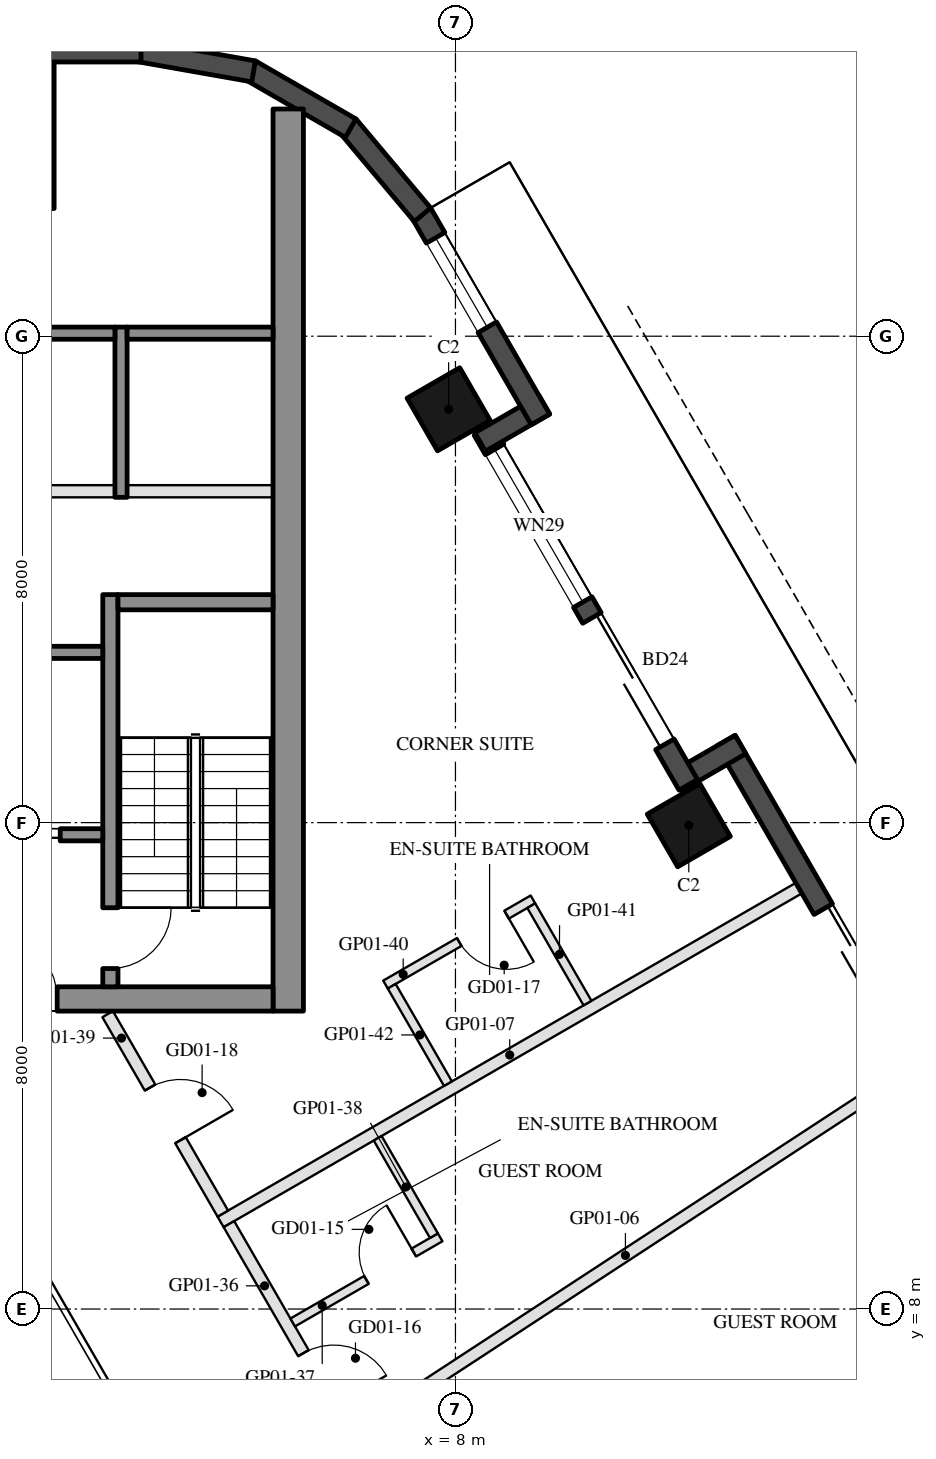
"""IFC4 building model, lengths in metres.
Left out: names, types, materials, properties, quantities, classifications, styles, units other than length and angle.
Written with IfcOpenShell. Run it as: python <this file> out.ifc"""

import sys

from ifc_helpers import new_model, si_unit, direction, frame, frame_2d, origin, origin_2d, place, context, subcontext, project, spatial, rectangle, hollow_rectangle, extrude, element, fill, save


model = new_model("IFC4")
c1 = context("Model", 3, precision=1e-05, world=origin(), true_north=direction((0.0, 1.0)))
c2 = subcontext(c1, "Body", "Model", "MODEL_VIEW")
j1 = project(units=[si_unit("LENGTHUNIT", "METRE"), si_unit("PLANEANGLEUNIT", "RADIAN")], contexts=[c1])
p1 = place(None, origin())
s1 = spatial("IfcSite", under=j1, at=p1, CompositionType="ELEMENT")
p2 = place(p1, origin())
s2 = spatial("IfcBuilding", under=s1, at=p2, CompositionType="ELEMENT")
p3 = place(p2, frame((0.0, 0.0, 46.5)))
s3 = spatial("IfcBuildingStorey", under=s2, at=p3, CompositionType="ELEMENT", Elevation=46.5)
for number, where, z_axis, x_axis in (
    (1, (11.838, 15.957, 0.0), (0.0, 0.0, 1.0), (-0.5, 0.866, 0.0)),
    (2, (7.888, 22.798, 0.0), (0.0, 0.0, 1.0), (-0.5, 0.866, 0.0)),
):
    element("IfcColumn", number, at=place(p3, frame(where, z_axis=z_axis, x_axis=x_axis)), inside=s3, PredefinedType="COLUMN", context=c2, shape_type="SweptSolid", body=[
        extrude(hollow_rectangle(XDim=1.0, YDim=1.0, WallThickness=0.045, at=origin_2d()), origin(), (0.0, 0.0, 1.0), 3.7),
    ])
p4 = place(p3, frame((0.0, 27.3, 0.0), z_axis=(0.0, 0.0, 1.0), x_axis=(1.0, 0.0, 0.0)))
e3 = element("IfcColumn", 3, at=p4, inside=s3, PredefinedType="COLUMN", context=c2, shape_type="SweptSolid", body=[
    extrude(hollow_rectangle(XDim=2.8, YDim=2.4, WallThickness=0.07, at=origin_2d()), origin(), (0.0, 0.0, 1.0), 3.7),
])
p5 = place(p3, frame((17.299, 8.948, 0.0), z_axis=(0.0, 0.0, 1.0), x_axis=(-0.500010041276, 0.866019606374, 0.0)))
e4 = element("IfcWall", 4, at=p5, inside=s3, PredefinedType="SOLIDWALL", context=c2, shape_type="SweptSolid", body=[
    extrude(rectangle(XDim=9.7, YDim=0.35, at=frame_2d((4.85, 0.0))), origin(), (0.0, 0.0, 1.0), 3.55),
])
p6 = place(p5, frame((1.8, 0.0, 0.0)))
e5 = element("IfcOpeningElement", 5, at=p6, cuts=e4, PredefinedType="OPENING", context=c2, shape_type="SweptSolid", body=[
    extrude(rectangle(XDim=1.2, YDim=2.4, at=frame_2d((0.6, 1.2))), frame((0.0, 0.185, 0.0), z_axis=(0.0, -1.0, 0.0), x_axis=(1.0, 0.0, 0.0)), (0.0, 0.0, 1.0), 0.37),
])
p7 = place(p5, frame((5.0, 0.0, 0.0)))
e6 = element("IfcOpeningElement", 6, at=p7, cuts=e4, PredefinedType="OPENING", context=c2, shape_type="SweptSolid", body=[
    extrude(rectangle(XDim=1.5, YDim=2.4, at=frame_2d((0.75, 1.2))), frame((0.0, 0.185, 0.0), z_axis=(0.0, -1.0, 0.0), x_axis=(1.0, 0.0, 0.0)), (0.0, 0.0, 1.0), 0.37),
])
p8 = place(p3, frame((12.688, 17.284, 0.0), z_axis=(0.0, 0.0, 1.0), x_axis=(-0.865955602162, -0.500120880472, 0.0)))
e7 = element("IfcWall", 7, at=p8, inside=s3, PredefinedType="SOLIDWALL", context=c2, shape_type="SweptSolid", body=[
    extrude(rectangle(XDim=1.22, YDim=0.35, at=frame_2d((0.61, 0.0))), origin(), (0.0, 0.0, 1.0), 3.55),
])
p9 = place(p3, frame((11.829, 16.621, 0.0), z_axis=(0.0, 0.0, 1.0), x_axis=(-0.500003597184, 0.866023326939, 0.0)))
e8 = element("IfcWall", 8, at=p9, inside=s3, PredefinedType="SOLIDWALL", context=c2, shape_type="SweptSolid", body=[
    extrude(rectangle(XDim=6.74, YDim=0.35, at=frame_2d((3.37, 0.0))), origin(), (0.0, 0.0, 1.0), 3.55),
])
p10 = place(p9, frame((0.77, 0.0, 0.0)))
e9 = element("IfcOpeningElement", 9, at=p10, cuts=e8, PredefinedType="OPENING", context=c2, shape_type="SweptSolid", body=[
    extrude(rectangle(XDim=2.4, YDim=2.4, at=frame_2d((1.2, 1.2))), frame((0.0, 0.185, 0.0), z_axis=(0.0, -1.0, 0.0), x_axis=(1.0, 0.0, 0.0)), (0.0, 0.0, 1.0), 0.37),
])
p11 = place(p9, frame((3.47, 0.0, 0.3)))
e10 = element("IfcOpeningElement", 10, at=p11, cuts=e8, PredefinedType="OPENING", context=c2, shape_type="SweptSolid", body=[
    extrude(rectangle(XDim=2.9, YDim=2.65, at=frame_2d((1.45, 1.325))), frame((0.0, 0.185, 0.0), z_axis=(0.0, -1.0, 0.0), x_axis=(1.0, 0.0, 0.0)), (0.0, 0.0, 1.0), 0.37),
])
p12 = place(p3, frame((8.406, 22.26, 0.0), z_axis=(0.0, 0.0, 1.0), x_axis=(0.865955602162, 0.500120880472, 0.0)))
e11 = element("IfcWall", 11, at=p12, inside=s3, PredefinedType="SOLIDWALL", context=c2, shape_type="SweptSolid", body=[
    extrude(rectangle(XDim=1.22, YDim=0.35, at=frame_2d((0.61, 0.0))), origin(), (0.0, 0.0, 1.0), 3.55),
])
p13 = place(p3, frame((9.398, 22.631, 0.0), z_axis=(0.0, 0.0, 1.0), x_axis=(-0.499954521343, 0.866051659307, 0.0)))
e12 = element("IfcWall", 12, at=p13, inside=s3, PredefinedType="SOLIDWALL", context=c2, shape_type="SweptSolid", body=[
    extrude(rectangle(XDim=3.916, YDim=0.35, at=frame_2d((1.958, 0.0))), origin(), (0.0, 0.0, 1.0), 3.55),
])
p14 = place(p13, frame((1.75, 0.0, 0.3)))
e13 = element("IfcOpeningElement", 13, at=p14, cuts=e12, PredefinedType="OPENING", context=c2, shape_type="SweptSolid", body=[
    extrude(rectangle(XDim=1.7, YDim=2.65, at=frame_2d((0.85, 1.325))), frame((0.0, 0.185, 0.0), z_axis=(0.0, -1.0, 0.0), x_axis=(1.0, 0.0, 0.0)), (0.0, 0.0, 1.0), 0.37),
])
p15 = place(p3, frame((7.458, 25.998, 0.0), z_axis=(0.0, 0.0, 1.0), x_axis=(-0.642808304945, 0.766027077259, 0.0)))
e14 = element("IfcWall", 14, at=p15, inside=s3, PredefinedType="SOLIDWALL", context=c2, shape_type="SweptSolid", body=[
    extrude(rectangle(XDim=1.91, YDim=0.35, at=frame_2d((0.955, 0.0))), origin(), (0.0, 0.0, 1.0), 3.55),
])
for number, where, z_axis, x_axis in (
    (15, (6.277, 27.422, 0.0), (0.0, 0.0, 1.0), (-0.866, 0.5, 0.0)),
    (16, (4.68, 28.356, 0.0), (0.0, 0.0, 1.0), (-0.985, 0.174, 0.0)),
):
    element("IfcWall", number, at=place(p3, frame(where, z_axis=z_axis, x_axis=x_axis)), inside=s3, PredefinedType="SOLIDWALL", context=c2, shape_type="SweptSolid", body=[
        extrude(rectangle(XDim=1.91, YDim=0.35, at=frame_2d((0.955, 0.0))), origin(), (0.0, 0.0, 1.0), 3.55),
    ])
p16 = place(p3, frame((2.829, 28.685, 0.0), z_axis=(0.0, 0.0, 1.0), x_axis=(-1.0, 0.0, 0.0)))
e17 = element("IfcWall", 17, at=p16, inside=s3, PredefinedType="SOLIDWALL", context=c2, shape_type="SweptSolid", body=[
    extrude(rectangle(XDim=5.658, YDim=0.35, at=frame_2d((2.829, 0.0))), origin(), (0.0, 0.0, 1.0), 3.55),
])
p17 = place(p3, frame((5.25, 12.9, 0.0), z_axis=(0.0, 0.0, 1.0), x_axis=(0.0, 1.0, 0.0)))
e18 = element("IfcWall", 18, at=p17, inside=s3, PredefinedType="SHEAR", context=c2, shape_type="SweptSolid", body=[
    extrude(rectangle(XDim=14.837, YDim=0.5, at=frame_2d((7.418, 0.0))), origin(), (0.0, 0.0, 1.0), 3.5),
])
p18 = place(p3, frame((5.0, 13.1, 0.0), z_axis=(0.0, 0.0, 1.0), x_axis=(-1.0, 0.0, 0.0)))
e19 = element("IfcWall", 19, at=p18, inside=s3, PredefinedType="SHEAR", context=c2, shape_type="SweptSolid", body=[
    extrude(rectangle(XDim=10.0, YDim=0.4, at=frame_2d((5.0, 0.0))), origin(), (0.0, 0.0, 1.0), 3.5),
])
p19 = place(p18, frame((3.55, 0.0, 0.0)))
e20 = element("IfcOpeningElement", 20, at=p19, cuts=e19, PredefinedType="OPENING", context=c2, shape_type="SweptSolid", body=[
    extrude(rectangle(XDim=1.1, YDim=2.1, at=frame_2d((0.55, 1.05))), frame((0.0, 0.21, 0.0), z_axis=(0.0, -1.0, 0.0), x_axis=(1.0, 0.0, 0.0)), (0.0, 0.0, 1.0), 0.42),
])
p20 = place(p18, frame((5.85, 0.0, 0.0)))
e21 = element("IfcOpeningElement", 21, at=p20, cuts=e19, PredefinedType="OPENING", context=c2, shape_type="SweptSolid", body=[
    extrude(rectangle(XDim=1.4, YDim=2.1, at=frame_2d((0.7, 1.05))), frame((0.0, 0.21, 0.0), z_axis=(0.0, -1.0, 0.0), x_axis=(1.0, 0.0, 0.0)), (0.0, 0.0, 1.0), 0.42),
])
p21 = place(p3, frame((2.325, 13.3, 0.0), z_axis=(0.0, 0.0, 1.0), x_axis=(0.0, 1.0, 0.0)))
e22 = element("IfcWall", 22, at=p21, inside=s3, PredefinedType="SHEAR", context=c2, shape_type="SweptSolid", body=[
    extrude(rectangle(XDim=6.45, YDim=0.25, at=frame_2d((3.225, 0.0))), origin(), (0.0, 0.0, 1.0), 3.5),
])
p22 = place(p21, frame((0.3, 0.0, 0.0)))
e23 = element("IfcOpeningElement", 23, at=p22, cuts=e22, PredefinedType="OPENING", context=c2, shape_type="SweptSolid", body=[
    extrude(rectangle(XDim=1.0, YDim=2.1, at=frame_2d((0.5, 1.05))), frame((0.0, 0.135, 0.0), z_axis=(0.0, -1.0, 0.0), x_axis=(1.0, 0.0, 0.0)), (0.0, 0.0, 1.0), 0.27),
])
p23 = place(p3, frame((5.0, 19.625, 0.0), z_axis=(0.0, 0.0, 1.0), x_axis=(-1.0, 0.0, 0.0)))
e24 = element("IfcWall", 24, at=p23, inside=s3, PredefinedType="SHEAR", context=c2, shape_type="SweptSolid", body=[
    extrude(rectangle(XDim=2.55, YDim=0.25, at=frame_2d((1.275, 0.0))), origin(), (0.0, 0.0, 1.0), 3.5),
])
p24 = place(p3, frame((2.2, 18.8, 0.0), z_axis=(0.0, 0.0, 1.0), x_axis=(-1.0, 0.0, 0.0)))
e25 = element("IfcWall", 25, at=p24, inside=s3, PredefinedType="SHEAR", context=c2, shape_type="SweptSolid", body=[
    extrude(rectangle(XDim=2.8, YDim=0.2, at=frame_2d((1.4, 0.0))), origin(), (0.0, 0.0, 1.0), 3.5),
])
p25 = place(p3, frame((2.2, 15.8, 0.0), z_axis=(0.0, 0.0, 1.0), x_axis=(-1.0, 0.0, 0.0)))
e26 = element("IfcWall", 26, at=p25, inside=s3, PredefinedType="SHEAR", context=c2, shape_type="SweptSolid", body=[
    extrude(rectangle(XDim=2.8, YDim=0.2, at=frame_2d((1.4, 0.0))), origin(), (0.0, 0.0, 1.0), 3.5),
])
p26 = place(p25, frame((0.7, 0.0, 0.0)))
e27 = element("IfcOpeningElement", 27, at=p26, cuts=e26, PredefinedType="OPENING", context=c2, shape_type="SweptSolid", body=[
    extrude(rectangle(XDim=1.2, YDim=2.1, at=frame_2d((0.6, 1.05))), frame((0.0, 0.11, 0.0), z_axis=(0.0, -1.0, 0.0), x_axis=(1.0, 0.0, 0.0)), (0.0, 0.0, 1.0), 0.22),
])
p27 = place(p3, frame((2.5, 21.35, 0.0), z_axis=(0.0, 0.0, 1.0), x_axis=(0.0, 1.0, 0.0)))
e28 = element("IfcWall", 28, at=p27, inside=s3, PredefinedType="SHEAR", context=c2, shape_type="SweptSolid", body=[
    extrude(rectangle(XDim=2.8, YDim=0.2, at=frame_2d((1.4, 0.0))), origin(), (0.0, 0.0, 1.0), 3.5),
])
p28 = place(p3, frame((5.0, 24.05, 0.0), z_axis=(0.0, 0.0, 1.0), x_axis=(-1.0, 0.0, 0.0)))
e29 = element("IfcWall", 29, at=p28, inside=s3, PredefinedType="SHEAR", context=c2, shape_type="SweptSolid", body=[
    extrude(rectangle(XDim=2.4, YDim=0.2, at=frame_2d((1.2, 0.0))), origin(), (0.0, 0.0, 1.0), 3.5),
])
p29 = place(p3, frame((2.4, 24.05, 0.0), z_axis=(0.0, 0.0, 1.0), x_axis=(-1.0, 0.0, 0.0)))
e30 = element("IfcWall", 30, at=p29, inside=s3, PredefinedType="SHEAR", context=c2, shape_type="SweptSolid", body=[
    extrude(rectangle(XDim=2.8, YDim=0.2, at=frame_2d((1.4, 0.0))), origin(), (0.0, 0.0, 1.0), 3.5),
])
p30 = place(p3, frame((5.0, 21.45, 0.0), z_axis=(0.0, 0.0, 1.0), x_axis=(-1.0, 0.0, 0.0)))
e31 = element("IfcWall", 31, at=p30, inside=s3, PredefinedType="PARTITIONING", context=c2, shape_type="SweptSolid", body=[
    extrude(rectangle(XDim=2.4, YDim=0.2, at=frame_2d((1.2, 0.0))), origin(), (0.0, 0.0, 1.0), 3.5),
])
p31 = place(p3, frame((2.4, 21.45, 0.0), z_axis=(0.0, 0.0, 1.0), x_axis=(-1.0, 0.0, 0.0)))
e32 = element("IfcWall", 32, at=p31, inside=s3, PredefinedType="PARTITIONING", context=c2, shape_type="SweptSolid", body=[
    extrude(rectangle(XDim=2.8, YDim=0.2, at=frame_2d((1.4, 0.0))), origin(), (0.0, 0.0, 1.0), 3.5),
])
p32 = place(p3, frame((17.055, 7.22, 0.0), z_axis=(0.0, 0.0, 1.0), x_axis=(-0.87960357017, -0.475707430407, 0.0)))
e33 = element("IfcWall", 33, at=p32, inside=s3, PredefinedType="PARTITIONING", context=c2, shape_type="SweptSolid", body=[
    extrude(rectangle(XDim=10.084, YDim=0.2, at=frame_2d((5.042, 0.0))), origin(), (0.0, 0.0, 1.0), 2.96),
])
p33 = place(p3, frame((15.397, 11.892, 0.0), z_axis=(0.0, 0.0, 1.0), x_axis=(-0.836898817878, -0.547357624076, 0.0)))
e34 = element("IfcWall", 34, at=p33, inside=s3, PredefinedType="PARTITIONING", context=c2, shape_type="SweptSolid", body=[
    extrude(rectangle(XDim=10.997, YDim=0.2, at=frame_2d((5.499, 0.0))), origin(), (0.0, 0.0, 1.0), 2.96),
])
p34 = place(p3, frame((13.647, 14.923, 0.0), z_axis=(0.0, 0.0, 1.0), x_axis=(-0.866027479907, -0.499996404033, 0.0)))
e35 = element("IfcWall", 35, at=p34, inside=s3, PredefinedType="PARTITIONING", context=c2, shape_type="SweptSolid", body=[
    extrude(rectangle(XDim=10.98, YDim=0.2, at=frame_2d((5.49, 0.0))), origin(), (0.0, 0.0, 1.0), 2.96),
])
p35 = place(p3, frame((4.275, 9.396, 0.0), z_axis=(0.0, 0.0, 1.0), x_axis=(0.499971370958, -0.866041932139, 0.0)))
e36 = element("IfcWall", 36, at=p35, inside=s3, PredefinedType="PARTITIONING", context=c2, shape_type="SweptSolid", body=[
    extrude(rectangle(XDim=3.906, YDim=0.2, at=frame_2d((1.953, 0.0))), origin(), (0.0, 0.0, 1.0), 2.95),
])
p36 = place(p35, frame((2.45, 0.0, 0.0)))
e37 = element("IfcOpeningElement", 37, at=p36, cuts=e36, PredefinedType="OPENING", context=c2, shape_type="SweptSolid", body=[
    extrude(rectangle(XDim=1.0, YDim=2.1, at=frame_2d((0.5, 1.05))), frame((0.0, 0.11, 0.0), z_axis=(0.0, -1.0, 0.0), x_axis=(1.0, 0.0, 0.0)), (0.0, 0.0, 1.0), 0.22),
])
p37 = place(p3, frame((5.324, 7.779, 0.0), z_axis=(0.0, 0.0, 1.0), x_axis=(0.865996816683, 0.500049511043, 0.0)))
e38 = element("IfcWall", 38, at=p37, inside=s3, PredefinedType="PARTITIONING", context=c2, shape_type="SweptSolid", body=[
    extrude(rectangle(XDim=2.8, YDim=0.15, at=frame_2d((1.4, 0.0))), origin(), (0.0, 0.0, 1.0), 2.95),
])
p38 = place(p37, frame((1.4, 0.0, 0.0)))
e39 = element("IfcOpeningElement", 39, at=p38, cuts=e38, PredefinedType="OPENING", context=c2, shape_type="SweptSolid", body=[
    extrude(rectangle(XDim=0.9, YDim=2.1, at=frame_2d((0.45, 1.05))), frame((0.0, 0.085, 0.0), z_axis=(0.0, -1.0, 0.0), x_axis=(1.0, 0.0, 0.0)), (0.0, 0.0, 1.0), 0.17),
])
p39 = place(p3, frame((7.646, 9.207, 0.0), z_axis=(0.0, 0.0, 1.0), x_axis=(-0.49994333299, 0.866058118026, 0.0)))
e40 = element("IfcWall", 40, at=p39, inside=s3, PredefinedType="PARTITIONING", context=c2, shape_type="SweptSolid", body=[
    extrude(rectangle(XDim=1.85, YDim=0.15, at=frame_2d((0.925, 0.0))), origin(), (0.0, 0.0, 1.0), 3.55),
])
p40 = place(p3, frame((2.281, 12.85, 0.0), z_axis=(0.0, 0.0, 1.0), x_axis=(0.499979074716, -0.866037484666, 0.0)))
e41 = element("IfcWall", 41, at=p40, inside=s3, PredefinedType="PARTITIONING", context=c2, shape_type="SweptSolid", body=[
    extrude(rectangle(XDim=3.788, YDim=0.2, at=frame_2d((1.894, 0.0))), origin(), (0.0, 0.0, 1.0), 2.95),
])
p41 = place(p40, frame((1.394, 0.0, 0.0)))
e42 = element("IfcOpeningElement", 42, at=p41, cuts=e41, PredefinedType="OPENING", context=c2, shape_type="SweptSolid", body=[
    extrude(rectangle(XDim=1.0, YDim=2.1, at=frame_2d((0.5, 1.05))), frame((0.0, 0.11, 0.0), z_axis=(0.0, -1.0, 0.0), x_axis=(1.0, 0.0, 0.0)), (0.0, 0.0, 1.0), 0.22),
])
p42 = place(p3, frame((9.274, 14.737, 0.0), z_axis=(0.0, 0.0, 1.0), x_axis=(-0.866018616679, -0.500011755427, 0.0)))
e43 = element("IfcWall", 43, at=p42, inside=s3, PredefinedType="PARTITIONING", context=c2, shape_type="SweptSolid", body=[
    extrude(rectangle(XDim=2.8, YDim=0.15, at=frame_2d((1.4, 0.0))), origin(), (0.0, 0.0, 1.0), 3.55),
])
p43 = place(p42, frame((0.5, 0.0, 0.0)))
e44 = element("IfcOpeningElement", 44, at=p43, cuts=e43, PredefinedType="OPENING", context=c2, shape_type="SweptSolid", body=[
    extrude(rectangle(XDim=0.9, YDim=2.1, at=frame_2d((0.45, 1.05))), frame((0.0, 0.085, 0.0), z_axis=(0.0, -1.0, 0.0), x_axis=(1.0, 0.0, 0.0)), (0.0, 0.0, 1.0), 0.17),
])
p44 = place(p3, frame((10.172, 13.032, 0.0), z_axis=(0.0, 0.0, 1.0), x_axis=(-0.500042316284, 0.866000971088, 0.0)))
e45 = element("IfcWall", 45, at=p44, inside=s3, PredefinedType="PARTITIONING", context=c2, shape_type="SweptSolid", body=[
    extrude(rectangle(XDim=1.85, YDim=0.15, at=frame_2d((0.925, 0.0))), origin(), (0.0, 0.0, 1.0), 2.95),
])
p45 = place(p3, frame((7.877, 11.707, 0.0), z_axis=(0.0, 0.0, 1.0), x_axis=(-0.499985172903, 0.866033964044, 0.0)))
e46 = element("IfcWall", 46, at=p45, inside=s3, PredefinedType="PARTITIONING", context=c2, shape_type="SweptSolid", body=[
    extrude(rectangle(XDim=1.85, YDim=0.15, at=frame_2d((0.925, 0.0))), origin(), (0.0, 0.0, 1.0), 2.95),
])
p46 = place(p7, frame((1.5, 0.0, 0.0), z_axis=(0.0, 0.0, 1.0), x_axis=(-1.0, 0.0, 0.0)))
e47 = element("IfcDoor", 47, at=p46, inside=s3, OperationType="SLIDING_TO_LEFT", PredefinedType="DOOR", context=c2, shape_type="SweptSolid", body=[
    extrude(rectangle(XDim=1.5, YDim=2.4, at=frame_2d((0.75, 1.2))), frame((0.0, 0.025, 0.0), z_axis=(0.0, -1.0, 0.0), x_axis=(1.0, 0.0, 0.0)), (0.0, 0.0, 1.0), 0.05),
])
fill(e6, e47)
p47 = place(p10, frame((2.4, 0.0, 0.0), z_axis=(0.0, 0.0, 1.0), x_axis=(-1.0, 0.0, 0.0)))
e48 = element("IfcDoor", 48, at=p47, inside=s3, OperationType="SLIDING_TO_LEFT", PredefinedType="DOOR", context=c2, shape_type="SweptSolid", body=[
    extrude(rectangle(XDim=2.4, YDim=2.4, at=frame_2d((1.2, 1.2))), frame((0.0, 0.025, 0.0), z_axis=(0.0, -1.0, 0.0), x_axis=(1.0, 0.0, 0.0)), (0.0, 0.0, 1.0), 0.05),
])
fill(e9, e48)
p48 = place(p11, origin())
e49 = element("IfcWindow", 49, at=p48, inside=s3, PartitioningType="SINGLE_PANEL", PredefinedType="WINDOW", context=c2, shape_type="SweptSolid", body=[
    extrude(rectangle(XDim=2.9, YDim=2.65, at=frame_2d((1.45, 1.325))), frame((0.0, 0.03, 0.0), z_axis=(0.0, -1.0, 0.0), x_axis=(1.0, 0.0, 0.0)), (0.0, 0.0, 1.0), 0.06),
])
fill(e10, e49)
p49 = place(p14, origin())
e50 = element("IfcWindow", 50, at=p49, inside=s3, PartitioningType="SINGLE_PANEL", PredefinedType="WINDOW", context=c2, shape_type="SweptSolid", body=[
    extrude(rectangle(XDim=1.7, YDim=2.65, at=frame_2d((0.85, 1.325))), frame((0.0, 0.03, 0.0), z_axis=(0.0, -1.0, 0.0), x_axis=(1.0, 0.0, 0.0)), (0.0, 0.0, 1.0), 0.06),
])
fill(e13, e50)
p50 = place(p26, origin())
e51 = element("IfcDoor", 51, at=p50, inside=s3, OperationType="DOUBLE_DOOR_SLIDING", PredefinedType="DOOR", context=c2, shape_type="SweptSolid", body=[
    extrude(rectangle(XDim=1.2, YDim=2.1, at=frame_2d((0.6, 1.05))), frame((0.0, 0.025, 0.0), z_axis=(0.0, -1.0, 0.0), x_axis=(1.0, 0.0, 0.0)), (0.0, 0.0, 1.0), 0.05),
])
fill(e27, e51)
p51 = place(p19, frame((1.1, 0.0, 0.0), z_axis=(0.0, 0.0, 1.0), x_axis=(-1.0, 0.0, 0.0)))
e52 = element("IfcDoor", 52, at=p51, inside=s3, OperationType="SINGLE_SWING_LEFT", PredefinedType="DOOR", context=c2, shape_type="SweptSolid", body=[
    extrude(rectangle(XDim=1.1, YDim=2.1, at=frame_2d((0.55, 1.05))), frame((0.0, 0.025, 0.0), z_axis=(0.0, -1.0, 0.0), x_axis=(1.0, 0.0, 0.0)), (0.0, 0.0, 1.0), 0.05),
])
fill(e20, e52)
p52 = place(p22, frame((1.0, 0.0, 0.0), z_axis=(0.0, 0.0, 1.0), x_axis=(-1.0, 0.0, 0.0)))
e53 = element("IfcDoor", 53, at=p52, inside=s3, OperationType="SINGLE_SWING_LEFT", PredefinedType="DOOR", context=c2, shape_type="SweptSolid", body=[
    extrude(rectangle(XDim=1.0, YDim=2.1, at=frame_2d((0.5, 1.05))), frame((0.0, 0.025, 0.0), z_axis=(0.0, -1.0, 0.0), x_axis=(1.0, 0.0, 0.0)), (0.0, 0.0, 1.0), 0.05),
])
fill(e23, e53)
p53 = place(p38, origin())
e54 = element("IfcDoor", 54, at=p53, inside=s3, OperationType="SINGLE_SWING_RIGHT", PredefinedType="DOOR", context=c2, shape_type="SweptSolid", body=[
    extrude(rectangle(XDim=0.9, YDim=2.1, at=frame_2d((0.45, 1.05))), frame((0.0, 0.025, 0.0), z_axis=(0.0, -1.0, 0.0), x_axis=(1.0, 0.0, 0.0)), (0.0, 0.0, 1.0), 0.05),
])
fill(e39, e54)
p54 = place(p36, origin())
e55 = element("IfcDoor", 55, at=p54, inside=s3, OperationType="SINGLE_SWING_RIGHT", PredefinedType="DOOR", context=c2, shape_type="SweptSolid", body=[
    extrude(rectangle(XDim=1.0, YDim=2.1, at=frame_2d((0.5, 1.05))), frame((0.0, 0.025, 0.0), z_axis=(0.0, -1.0, 0.0), x_axis=(1.0, 0.0, 0.0)), (0.0, 0.0, 1.0), 0.05),
])
fill(e37, e55)
p55 = place(p43, origin())
e56 = element("IfcDoor", 56, at=p55, inside=s3, OperationType="SINGLE_SWING_LEFT", PredefinedType="DOOR", context=c2, shape_type="SweptSolid", body=[
    extrude(rectangle(XDim=0.9, YDim=2.1, at=frame_2d((0.45, 1.05))), frame((0.0, 0.025, 0.0), z_axis=(0.0, -1.0, 0.0), x_axis=(1.0, 0.0, 0.0)), (0.0, 0.0, 1.0), 0.05),
])
fill(e44, e56)
p56 = place(p41, origin())
e57 = element("IfcDoor", 57, at=p56, inside=s3, OperationType="SINGLE_SWING_RIGHT", PredefinedType="DOOR", context=c2, shape_type="SweptSolid", body=[
    extrude(rectangle(XDim=1.0, YDim=2.1, at=frame_2d((0.5, 1.05))), frame((0.0, 0.025, 0.0), z_axis=(0.0, -1.0, 0.0), x_axis=(1.0, 0.0, 0.0)), (0.0, 0.0, 1.0), 0.05),
])
fill(e42, e57)
save(model, sys.argv[1])
